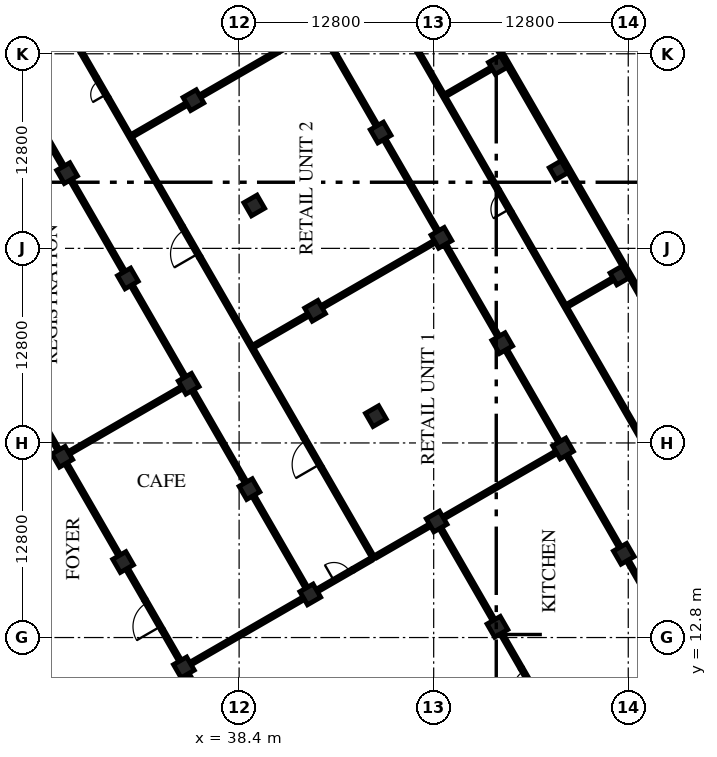
"""IFC4 building model, lengths in metres.
Left out: names, types, materials, properties, quantities, classifications, styles, units other than length and angle.
Written with IfcOpenShell. Run it as: python <this file> out.ifc"""

import sys

from ifc_helpers import new_model, si_unit, direction, frame, frame_2d, origin, origin_2d, place, context, subcontext, project, spatial, rectangle, extrude, element, fill, save


model = new_model("IFC4")
c1 = context("Model", 3, precision=1e-05, world=origin(), true_north=direction((0.0, 1.0)))
c2 = subcontext(c1, "Body", "Model", "MODEL_VIEW")
j1 = project(units=[si_unit("LENGTHUNIT", "METRE"), si_unit("PLANEANGLEUNIT", "RADIAN")], contexts=[c1])
p1 = place(None, origin())
s1 = spatial("IfcSite", under=j1, at=p1, CompositionType="ELEMENT")
p2 = place(p1, origin())
s2 = spatial("IfcBuilding", under=s1, at=p2, CompositionType="ELEMENT")
p3 = place(p2, origin())
s3 = spatial("IfcBuildingStorey", under=s2, at=p3, CompositionType="ELEMENT", Elevation=0.0)
for number, where, z_axis, x_axis in (
    (1, (55.396, 13.508, -0.3), (0.0, 0.0, 1.0), (-0.5, 0.866, 0.0)),
    (2, (63.71, 18.308, -0.3), (0.0, 0.0, 1.0), (-0.5, 0.866, 0.0)),
    (3, (34.768, 10.836, -0.3), (0.0, 0.0, 1.0), (-0.5, 0.866, 0.0)),
    (4, (43.082, 15.636, -0.3), (0.0, 0.0, 1.0), (-0.5, 0.866, 0.0)),
    (5, (51.396, 20.436, -0.3), (0.0, 0.0, 1.0), (-0.5, 0.866, 0.0)),
    (6, (59.71, 25.236, -0.3), (0.0, 0.0, 1.0), (-0.5, 0.866, 0.0)),
    (7, (30.768, 17.764, -0.3), (0.0, 0.0, 1.0), (-0.5, 0.866, 0.0)),
    (8, (39.082, 22.564, -0.3), (0.0, 0.0, 1.0), (-0.5, 0.866, 0.0)),
    (9, (47.396, 27.364, -0.3), (0.0, 0.0, 1.0), (-0.5, 0.866, 0.0)),
    (10, (55.71, 32.164, -0.3), (0.0, 0.0, 1.0), (-0.5, 0.866, 0.0)),
):
    element("IfcColumn", number, at=place(p3, frame(where, z_axis=z_axis, x_axis=x_axis)), inside=s3, PredefinedType="COLUMN", context=c2, shape_type="SweptSolid", body=[
        extrude(rectangle(XDim=1.0, YDim=1.0, at=origin_2d()), origin(), (0.0, 0.0, 1.0), 6.3),
    ])
p4 = place(p3, frame((63.417, 36.614, -0.3), z_axis=(0.0, 0.0, 1.0), x_axis=(-0.5, 0.866025403784, 0.0)))
e11 = element("IfcColumn", 11, at=p4, inside=s3, PredefinedType="COLUMN", context=c2, shape_type="SweptSolid", body=[
    extrude(rectangle(XDim=0.9, YDim=0.9, at=origin_2d()), origin(), (0.0, 0.0, 1.0), 6.3),
])
for number, where, z_axis, x_axis in (
    (12, (26.768, 24.692, -0.3), (0.0, 0.0, 1.0), (-0.5, 0.866, 0.0)),
    (13, (35.082, 29.492, -0.3), (0.0, 0.0, 1.0), (-0.5, 0.866, 0.0)),
    (14, (43.396, 34.292, -0.3), (0.0, 0.0, 1.0), (-0.5, 0.866, 0.0)),
    (15, (51.71, 39.092, -0.3), (0.0, 0.0, 1.0), (-0.5, 0.866, 0.0)),
):
    element("IfcColumn", number, at=place(p3, frame(where, z_axis=z_axis, x_axis=x_axis)), inside=s3, PredefinedType="COLUMN", context=c2, shape_type="SweptSolid", body=[
        extrude(rectangle(XDim=1.0, YDim=1.0, at=origin_2d()), origin(), (0.0, 0.0, 1.0), 6.3),
    ])
p5 = place(p3, frame((59.417, 43.542, -0.3), z_axis=(0.0, 0.0, 1.0), x_axis=(-0.5, 0.866025403784, 0.0)))
e16 = element("IfcColumn", 16, at=p5, inside=s3, PredefinedType="COLUMN", context=c2, shape_type="SweptSolid", body=[
    extrude(rectangle(XDim=0.9, YDim=0.9, at=origin_2d()), origin(), (0.0, 0.0, 1.0), 6.3),
])
for number, where, z_axis, x_axis in (
    (17, (31.082, 36.42, -0.3), (0.0, 0.0, 1.0), (-0.5, 0.866, 0.0)),
    (18, (39.396, 41.22, -0.3), (0.0, 0.0, 1.0), (-0.5, 0.866, 0.0)),
    (19, (47.71, 46.021, -0.3), (0.0, 0.0, 1.0), (-0.5, 0.866, 0.0)),
):
    element("IfcColumn", number, at=place(p3, frame(where, z_axis=z_axis, x_axis=x_axis)), inside=s3, PredefinedType="COLUMN", context=c2, shape_type="SweptSolid", body=[
        extrude(rectangle(XDim=1.0, YDim=1.0, at=origin_2d()), origin(), (0.0, 0.0, 1.0), 6.3),
    ])
p6 = place(p3, frame((55.417, 50.47, -0.3), z_axis=(0.0, 0.0, 1.0), x_axis=(-0.5, 0.866025403784, 0.0)))
e20 = element("IfcColumn", 20, at=p6, inside=s3, PredefinedType="COLUMN", context=c2, shape_type="SweptSolid", body=[
    extrude(rectangle(XDim=0.9, YDim=0.9, at=origin_2d()), origin(), (0.0, 0.0, 1.0), 6.3),
])
for number, where, z_axis, x_axis in (
    (21, (27.082, 43.349, -0.3), (0.0, 0.0, 1.0), (-0.5, 0.866, 0.0)),
    (22, (35.396, 48.149, -0.3), (0.0, 0.0, 1.0), (-0.5, 0.866, 0.0)),
):
    element("IfcColumn", number, at=place(p3, frame(where, z_axis=z_axis, x_axis=x_axis)), inside=s3, PredefinedType="COLUMN", context=c2, shape_type="SweptSolid", body=[
        extrude(rectangle(XDim=1.0, YDim=1.0, at=origin_2d()), origin(), (0.0, 0.0, 1.0), 6.3),
    ])
p7 = place(p3, frame((47.49, 65.351, 0.0), z_axis=(0.0, 0.0, 1.0), x_axis=(0.499999548647, -0.866025664373, 0.0)))
e23 = element("IfcWall", 23, at=p7, inside=s3, PredefinedType="SOLIDWALL", context=c2, shape_type="SweptSolid", body=[
    extrude(rectangle(XDim=34.6, YDim=0.25, at=frame_2d((17.3, 0.0))), origin(), (0.0, 0.0, 1.0), 5.7),
])
p8 = place(p3, frame((38.518, 4.341, 0.0), z_axis=(0.0, 0.0, 1.0), x_axis=(-0.499995173006, 0.866028190633, 0.0)))
e24 = element("IfcWall", 24, at=p8, inside=s3, PredefinedType="PARTITIONING", context=c2, shape_type="SweptSolid", body=[
    extrude(rectangle(XDim=7.0, YDim=0.2, at=frame_2d((3.5, 0.0))), origin(), (0.0, 0.0, 1.0), 5.1),
])
p9 = place(p3, frame((34.518, 11.269, 0.0), z_axis=(0.0, 0.0, 1.0), x_axis=(-0.500016218704, 0.866016039709, 0.0)))
e25 = element("IfcWall", 25, at=p9, inside=s3, PredefinedType="PARTITIONING", context=c2, shape_type="SweptSolid", body=[
    extrude(rectangle(XDim=2.35, YDim=0.2, at=frame_2d((1.175, 0.0))), origin(), (0.0, 0.0, 1.0), 5.1),
])
p10 = place(p3, frame((33.343, 13.304, 0.0), z_axis=(0.0, 0.0, 1.0), x_axis=(-0.499952165731, 0.866053019151, 0.0)))
e26 = element("IfcWall", 26, at=p10, inside=s3, PredefinedType="PARTITIONING", context=c2, shape_type="SweptSolid", body=[
    extrude(rectangle(XDim=2.3, YDim=0.2, at=frame_2d((1.15, 0.0))), origin(), (0.0, 0.0, 1.0), 5.1),
])
p11 = place(p10, frame((0.25, 0.0, 0.0)))
e27 = element("IfcOpeningElement", 27, at=p11, cuts=e26, PredefinedType="OPENING", context=c2, shape_type="SweptSolid", body=[
    extrude(rectangle(XDim=1.8, YDim=2.1, at=frame_2d((0.9, 1.05))), frame((0.0, 0.11, 0.0), z_axis=(0.0, -1.0, 0.0), x_axis=(1.0, 0.0, 0.0)), (0.0, 0.0, 1.0), 0.22),
])
p12 = place(p3, frame((32.193, 15.296, 0.0), z_axis=(0.0, 0.0, 1.0), x_axis=(-0.500016218704, 0.866016039709, 0.0)))
e28 = element("IfcWall", 28, at=p12, inside=s3, PredefinedType="PARTITIONING", context=c2, shape_type="SweptSolid", body=[
    extrude(rectangle(XDim=2.35, YDim=0.2, at=frame_2d((1.175, 0.0))), origin(), (0.0, 0.0, 1.0), 5.1),
])
for number, where, z_axis, x_axis in (
    (29, (30.518, 18.197, 0.0), (0.0, 0.0, 1.0), (-0.5, 0.866, 0.0)),
    (30, (26.518, 25.125, 0.0), (0.0, 0.0, 1.0), (-0.5, 0.866, 0.0)),
    (31, (42.832, 16.069, 0.0), (0.0, 0.0, 1.0), (-0.5, 0.866, 0.0)),
):
    element("IfcWall", number, at=place(p3, frame(where, z_axis=z_axis, x_axis=x_axis)), inside=s3, PredefinedType="PARTITIONING", context=c2, shape_type="SweptSolid", body=[
        extrude(rectangle(XDim=7.0, YDim=0.2, at=frame_2d((3.5, 0.0))), origin(), (0.0, 0.0, 1.0), 5.1),
    ])
for number, where, z_axis, x_axis in (
    (32, (38.832, 22.997, 0.0), (0.0, 0.0, 1.0), (-0.5, 0.866, 0.0)),
    (33, (34.832, 29.925, 0.0), (0.0, 0.0, 1.0), (-0.5, 0.866, 0.0)),
    (34, (30.832, 36.854, 0.0), (0.0, 0.0, 1.0), (-0.5, 0.866, 0.0)),
):
    element("IfcWall", number, at=place(p3, frame(where, z_axis=z_axis, x_axis=x_axis)), inside=s3, PredefinedType="PARTITIONING", context=c2, shape_type="SweptSolid", body=[
        extrude(rectangle(XDim=7.0, YDim=0.2, at=frame_2d((3.5, 0.0))), origin(), (0.0, 0.0, 1.0), 5.1),
    ])
p13 = place(p3, frame((26.832, 43.781, 0.0), z_axis=(0.0, 0.0, 1.0), x_axis=(-0.499988857673, 0.866031836714, 0.0)))
e35 = element("IfcWall", 35, at=p13, inside=s3, PredefinedType="PARTITIONING", context=c2, shape_type="SweptSolid", body=[
    extrude(rectangle(XDim=6.875, YDim=0.2, at=frame_2d((3.438, 0.0))), origin(), (0.0, 0.0, 1.0), 5.1),
])
p14 = place(p3, frame((47.239, 18.036, 0.0), z_axis=(0.0, 0.0, 1.0), x_axis=(-0.500014519185, 0.866017020967, 0.0)))
e36 = element("IfcWall", 36, at=p14, inside=s3, PredefinedType="PARTITIONING", context=c2, shape_type="SweptSolid", body=[
    extrude(rectangle(XDim=6.85, YDim=0.2, at=frame_2d((3.425, 0.0))), origin(), (0.0, 0.0, 1.0), 5.1),
])
p15 = place(p3, frame((43.814, 23.968, 0.0), z_axis=(0.0, 0.0, 1.0), x_axis=(-0.500031774688, 0.866007057882, 0.0)))
e37 = element("IfcWall", 37, at=p15, inside=s3, PredefinedType="PARTITIONING", context=c2, shape_type="SweptSolid", body=[
    extrude(rectangle(XDim=2.3, YDim=0.2, at=frame_2d((1.15, 0.0))), origin(), (0.0, 0.0, 1.0), 5.1),
])
p16 = place(p15, frame((0.25, 0.0, 0.0)))
e38 = element("IfcOpeningElement", 38, at=p16, cuts=e37, PredefinedType="OPENING", context=c2, shape_type="SweptSolid", body=[
    extrude(rectangle(XDim=1.8, YDim=2.1, at=frame_2d((0.9, 1.05))), frame((0.0, 0.11, 0.0), z_axis=(0.0, -1.0, 0.0), x_axis=(1.0, 0.0, 0.0)), (0.0, 0.0, 1.0), 0.22),
])
p17 = place(p3, frame((42.664, 25.96, 0.0), z_axis=(0.0, 0.0, 1.0), x_axis=(-0.499993437113, 0.866029192836, 0.0)))
e39 = element("IfcWall", 39, at=p17, inside=s3, PredefinedType="PARTITIONING", context=c2, shape_type="SweptSolid", body=[
    extrude(rectangle(XDim=13.7, YDim=0.2, at=frame_2d((6.85, 0.0))), origin(), (0.0, 0.0, 1.0), 5.1),
])
p18 = place(p3, frame((35.814, 37.824, 0.0), z_axis=(0.0, 0.0, 1.0), x_axis=(-0.500031774688, 0.866007057882, 0.0)))
e40 = element("IfcWall", 40, at=p18, inside=s3, PredefinedType="PARTITIONING", context=c2, shape_type="SweptSolid", body=[
    extrude(rectangle(XDim=2.3, YDim=0.2, at=frame_2d((1.15, 0.0))), origin(), (0.0, 0.0, 1.0), 5.1),
])
p19 = place(p18, frame((0.25, 0.0, 0.0)))
e41 = element("IfcOpeningElement", 41, at=p19, cuts=e40, PredefinedType="OPENING", context=c2, shape_type="SweptSolid", body=[
    extrude(rectangle(XDim=1.8, YDim=2.1, at=frame_2d((0.9, 1.05))), frame((0.0, 0.11, 0.0), z_axis=(0.0, -1.0, 0.0), x_axis=(1.0, 0.0, 0.0)), (0.0, 0.0, 1.0), 0.22),
])
p20 = place(p3, frame((34.664, 39.816, 0.0), z_axis=(0.0, 0.0, 1.0), x_axis=(-0.49999201416, 0.866030014362, 0.0)))
e42 = element("IfcWall", 42, at=p20, inside=s3, PredefinedType="PARTITIONING", context=c2, shape_type="SweptSolid", body=[
    extrude(rectangle(XDim=9.8, YDim=0.2, at=frame_2d((4.9, 0.0))), origin(), (0.0, 0.0, 1.0), 5.1),
])
p21 = place(p3, frame((29.764, 48.303, 0.0), z_axis=(0.0, 0.0, 1.0), x_axis=(-0.500060622324, 0.86599040064, 0.0)))
e43 = element("IfcWall", 43, at=p21, inside=s3, PredefinedType="PARTITIONING", context=c2, shape_type="SweptSolid", body=[
    extrude(rectangle(XDim=1.5, YDim=0.2, at=frame_2d((0.75, 0.0))), origin(), (0.0, 0.0, 1.0), 5.1),
])
p22 = place(p21, frame((0.25, 0.0, 0.0)))
e44 = element("IfcOpeningElement", 44, at=p22, cuts=e43, PredefinedType="OPENING", context=c2, shape_type="SweptSolid", body=[
    extrude(rectangle(XDim=1.0, YDim=2.1, at=frame_2d((0.5, 1.05))), frame((0.0, 0.11, 0.0), z_axis=(0.0, -1.0, 0.0), x_axis=(1.0, 0.0, 0.0)), (0.0, 0.0, 1.0), 0.22),
])
p23 = place(p3, frame((29.014, 49.602, 0.0), z_axis=(0.0, 0.0, 1.0), x_axis=(-0.499963291492, 0.866046596414, 0.0)))
e45 = element("IfcWall", 45, at=p23, inside=s3, PredefinedType="PARTITIONING", context=c2, shape_type="SweptSolid", body=[
    extrude(rectangle(XDim=2.925, YDim=0.2, at=frame_2d((1.462, 0.0))), origin(), (0.0, 0.0, 1.0), 5.1),
])
p24 = place(p3, frame((57.821, 9.307, 0.0), z_axis=(0.0, 0.0, 1.0), x_axis=(-0.500062241894, 0.865989465428, 0.0)))
e46 = element("IfcWall", 46, at=p24, inside=s3, PredefinedType="PARTITIONING", context=c2, shape_type="SweptSolid", body=[
    extrude(rectangle(XDim=1.7, YDim=0.2, at=frame_2d((0.85, 0.0))), origin(), (0.0, 0.0, 1.0), 5.1),
])
p25 = place(p24, frame((0.25, 0.0, 0.0)))
e47 = element("IfcOpeningElement", 47, at=p25, cuts=e46, PredefinedType="OPENING", context=c2, shape_type="SweptSolid", body=[
    extrude(rectangle(XDim=1.2, YDim=2.1, at=frame_2d((0.6, 1.05))), frame((0.0, 0.11, 0.0), z_axis=(0.0, -1.0, 0.0), x_axis=(1.0, 0.0, 0.0)), (0.0, 0.0, 1.0), 0.22),
])
p26 = place(p3, frame((56.971, 10.78, 0.0), z_axis=(0.0, 0.0, 1.0), x_axis=(-0.499953715521, 0.866052124492, 0.0)))
e48 = element("IfcWall", 48, at=p26, inside=s3, PredefinedType="PARTITIONING", context=c2, shape_type="SweptSolid", body=[
    extrude(rectangle(XDim=2.65, YDim=0.2, at=frame_2d((1.325, 0.0))), origin(), (0.0, 0.0, 1.0), 5.1),
])
p27 = place(p3, frame((55.146, 13.941, 0.0), z_axis=(0.0, 0.0, 1.0), x_axis=(-0.500010275428, 0.866019471182, 0.0)))
e49 = element("IfcWall", 49, at=p27, inside=s3, PredefinedType="PARTITIONING", context=c2, shape_type="SweptSolid", body=[
    extrude(rectangle(XDim=7.0, YDim=0.2, at=frame_2d((3.5, 0.0))), origin(), (0.0, 0.0, 1.0), 5.1),
])
p28 = place(p3, frame((65.285, 15.58, 0.0), z_axis=(0.0, 0.0, 1.0), x_axis=(-0.499993606316, 0.866029095148, 0.0)))
e50 = element("IfcWall", 50, at=p28, inside=s3, PredefinedType="PARTITIONING", context=c2, shape_type="SweptSolid", body=[
    extrude(rectangle(XDim=2.65, YDim=0.2, at=frame_2d((1.325, 0.0))), origin(), (0.0, 0.0, 1.0), 5.1),
])
for number, where, z_axis, x_axis in (
    (51, (63.46, 18.74, 0.0), (0.0, 0.0, 1.0), (-0.5, 0.866, 0.0)),
    (52, (59.46, 25.669, 0.0), (0.0, 0.0, 1.0), (-0.5, 0.866, 0.0)),
    (53, (55.46, 32.597, 0.0), (0.0, 0.0, 1.0), (-0.5, 0.866, 0.0)),
    (54, (51.46, 39.525, 0.0), (0.0, 0.0, 1.0), (-0.5, 0.866, 0.0)),
    (55, (47.46, 46.453, 0.0), (0.0, 0.0, 1.0), (-0.5, 0.866, 0.0)),
):
    element("IfcWall", number, at=place(p3, frame(where, z_axis=z_axis, x_axis=x_axis)), inside=s3, PredefinedType="PARTITIONING", context=c2, shape_type="SweptSolid", body=[
        extrude(rectangle(XDim=7.0, YDim=0.2, at=frame_2d((3.5, 0.0))), origin(), (0.0, 0.0, 1.0), 5.1),
    ])
p29 = place(p3, frame((67.242, 21.79, 0.0), z_axis=(0.0, 0.0, 1.0), x_axis=(-0.500004551153, 0.866022776159, 0.0)))
e56 = element("IfcWall", 56, at=p29, inside=s3, PredefinedType="PARTITIONING", context=c2, shape_type="SweptSolid", body=[
    extrude(rectangle(XDim=21.9, YDim=0.2, at=frame_2d((10.95, 0.0))), origin(), (0.0, 0.0, 1.0), 5.1),
])
p30 = place(p3, frame((56.292, 40.756, 0.0), z_axis=(0.0, 0.0, 1.0), x_axis=(-0.499954529098, 0.86605165483, 0.0)))
e57 = element("IfcWall", 57, at=p30, inside=s3, PredefinedType="PARTITIONING", context=c2, shape_type="SweptSolid", body=[
    extrude(rectangle(XDim=1.7, YDim=0.2, at=frame_2d((0.85, 0.0))), origin(), (0.0, 0.0, 1.0), 5.1),
])
p31 = place(p30, frame((0.25, 0.0, 0.0)))
e58 = element("IfcOpeningElement", 58, at=p31, cuts=e57, PredefinedType="OPENING", context=c2, shape_type="SweptSolid", body=[
    extrude(rectangle(XDim=1.2, YDim=2.1, at=frame_2d((0.6, 1.05))), frame((0.0, 0.11, 0.0), z_axis=(0.0, -1.0, 0.0), x_axis=(1.0, 0.0, 0.0)), (0.0, 0.0, 1.0), 0.22),
])
p32 = place(p3, frame((55.442, 42.228, 0.0), z_axis=(0.0, 0.0, 1.0), x_axis=(-0.500004228592, 0.866022962392, 0.0)))
e59 = element("IfcWall", 59, at=p32, inside=s3, PredefinedType="PARTITIONING", context=c2, shape_type="SweptSolid", body=[
    extrude(rectangle(XDim=14.3, YDim=0.2, at=frame_2d((7.15, 0.0))), origin(), (0.0, 0.0, 1.0), 5.1),
])
p33 = place(p3, frame((35.201, 11.086, 0.0), z_axis=(0.0, 0.0, 1.0), x_axis=(0.866021068297, 0.500007509209, 0.0)))
e60 = element("IfcWall", 60, at=p33, inside=s3, PredefinedType="PARTITIONING", context=c2, shape_type="SweptSolid", body=[
    extrude(rectangle(XDim=8.6, YDim=0.2, at=frame_2d((4.3, 0.0))), origin(), (0.0, 0.0, 1.0), 5.1),
])
p34 = place(p3, frame((43.515, 15.886, 0.0), z_axis=(0.0, 0.0, 1.0), x_axis=(0.866027397988, 0.499996545922, 0.0)))
e61 = element("IfcWall", 61, at=p34, inside=s3, PredefinedType="PARTITIONING", context=c2, shape_type="SweptSolid", body=[
    extrude(rectangle(XDim=2.75, YDim=0.2, at=frame_2d((1.375, 0.0))), origin(), (0.0, 0.0, 1.0), 5.1),
])
p35 = place(p34, frame((1.3, 0.0, 0.0)))
e62 = element("IfcOpeningElement", 62, at=p35, cuts=e61, PredefinedType="OPENING", context=c2, shape_type="SweptSolid", body=[
    extrude(rectangle(XDim=1.2, YDim=2.1, at=frame_2d((0.6, 1.05))), frame((0.0, 0.11, 0.0), z_axis=(0.0, -1.0, 0.0), x_axis=(1.0, 0.0, 0.0)), (0.0, 0.0, 1.0), 0.22),
])
p36 = place(p3, frame((45.896, 17.261, 0.0), z_axis=(0.0, 0.0, 1.0), x_axis=(0.866017369001, 0.500013916395, 0.0)))
e63 = element("IfcWall", 63, at=p36, inside=s3, PredefinedType="PARTITIONING", context=c2, shape_type="SweptSolid", body=[
    extrude(rectangle(XDim=1.45, YDim=0.2, at=frame_2d((0.725, 0.0))), origin(), (0.0, 0.0, 1.0), 5.1),
])
p37 = place(p3, frame((47.325, 18.086, 0.0), z_axis=(0.0, 0.0, 1.0), x_axis=(0.866023935413, 0.500002543286, 0.0)))
e64 = element("IfcWall", 64, at=p37, inside=s3, PredefinedType="PARTITIONING", context=c2, shape_type="SweptSolid", body=[
    extrude(rectangle(XDim=4.2, YDim=0.2, at=frame_2d((2.1, 0.0))), origin(), (0.0, 0.0, 1.0), 5.1),
])
p38 = place(p3, frame((51.829, 20.686, 0.0), z_axis=(0.0, 0.0, 1.0), x_axis=(0.866021068297, 0.500007509209, 0.0)))
e65 = element("IfcWall", 65, at=p38, inside=s3, PredefinedType="PARTITIONING", context=c2, shape_type="SweptSolid", body=[
    extrude(rectangle(XDim=8.6, YDim=0.2, at=frame_2d((4.3, 0.0))), origin(), (0.0, 0.0, 1.0), 5.1),
])
p39 = place(p3, frame((59.953, 34.614, 0.0), z_axis=(0.0, 0.0, 1.0), x_axis=(0.8660424351, 0.499970499736, 0.0)))
e66 = element("IfcWall", 66, at=p39, inside=s3, PredefinedType="PARTITIONING", context=c2, shape_type="SweptSolid", body=[
    extrude(rectangle(XDim=3.55, YDim=0.2, at=frame_2d((1.775, 0.0))), origin(), (0.0, 0.0, 1.0), 5.1),
])
p40 = place(p3, frame((27.201, 24.942, 0.0), z_axis=(0.0, 0.0, 1.0), x_axis=(0.866021068297, 0.500007509209, 0.0)))
e67 = element("IfcWall", 67, at=p40, inside=s3, PredefinedType="PARTITIONING", context=c2, shape_type="SweptSolid", body=[
    extrude(rectangle(XDim=8.6, YDim=0.2, at=frame_2d((4.3, 0.0))), origin(), (0.0, 0.0, 1.0), 5.1),
])
p41 = place(p3, frame((39.325, 31.942, 0.0), z_axis=(0.0, 0.0, 1.0), x_axis=(0.866023935413, 0.500002543286, 0.0)))
e68 = element("IfcWall", 68, at=p41, inside=s3, PredefinedType="PARTITIONING", context=c2, shape_type="SweptSolid", body=[
    extrude(rectangle(XDim=4.2, YDim=0.2, at=frame_2d((2.1, 0.0))), origin(), (0.0, 0.0, 1.0), 5.1),
])
p42 = place(p3, frame((43.829, 34.542, 0.0), z_axis=(0.0, 0.0, 1.0), x_axis=(0.866021068297, 0.500007509209, 0.0)))
e69 = element("IfcWall", 69, at=p42, inside=s3, PredefinedType="PARTITIONING", context=c2, shape_type="SweptSolid", body=[
    extrude(rectangle(XDim=8.6, YDim=0.2, at=frame_2d((4.3, 0.0))), origin(), (0.0, 0.0, 1.0), 5.1),
])
p43 = place(p3, frame((51.953, 48.47, 0.0), z_axis=(0.0, 0.0, 1.0), x_axis=(0.8660424351, 0.499970499736, 0.0)))
e70 = element("IfcWall", 70, at=p43, inside=s3, PredefinedType="PARTITIONING", context=c2, shape_type="SweptSolid", body=[
    extrude(rectangle(XDim=3.55, YDim=0.2, at=frame_2d((1.775, 0.0))), origin(), (0.0, 0.0, 1.0), 5.1),
])
p44 = place(p3, frame((31.325, 45.799, 0.0), z_axis=(0.0, 0.0, 1.0), x_axis=(0.866023935413, 0.500002543286, 0.0)))
e71 = element("IfcWall", 71, at=p44, inside=s3, PredefinedType="PARTITIONING", context=c2, shape_type="SweptSolid", body=[
    extrude(rectangle(XDim=4.2, YDim=0.2, at=frame_2d((2.1, 0.0))), origin(), (0.0, 0.0, 1.0), 5.1),
])
p45 = place(p3, frame((35.829, 48.399, 0.0), z_axis=(0.0, 0.0, 1.0), x_axis=(0.866033360935, 0.499986217557, 0.0)))
e72 = element("IfcWall", 72, at=p45, inside=s3, PredefinedType="PARTITIONING", context=c2, shape_type="SweptSolid", body=[
    extrude(rectangle(XDim=8.6, YDim=0.2, at=frame_2d((4.3, 0.0))), origin(), (0.0, 0.0, 1.0), 5.1),
])
p46 = place(p11, origin())
e73 = element("IfcDoor", 73, at=p46, inside=s3, OperationType="DOUBLE_DOOR_SINGLE_SWING", PredefinedType="DOOR", context=c2, shape_type="SweptSolid", body=[
    extrude(rectangle(XDim=1.8, YDim=2.1, at=frame_2d((0.9, 1.05))), frame((0.0, 0.025, 0.0), z_axis=(0.0, -1.0, 0.0), x_axis=(1.0, 0.0, 0.0)), (0.0, 0.0, 1.0), 0.05),
])
fill(e27, e73)
p47 = place(p16, origin())
e74 = element("IfcDoor", 74, at=p47, inside=s3, OperationType="DOUBLE_DOOR_SINGLE_SWING", PredefinedType="DOOR", context=c2, shape_type="SweptSolid", body=[
    extrude(rectangle(XDim=1.8, YDim=2.1, at=frame_2d((0.9, 1.05))), frame((0.0, 0.025, 0.0), z_axis=(0.0, -1.0, 0.0), x_axis=(1.0, 0.0, 0.0)), (0.0, 0.0, 1.0), 0.05),
])
fill(e38, e74)
p48 = place(p19, origin())
e75 = element("IfcDoor", 75, at=p48, inside=s3, OperationType="DOUBLE_DOOR_SINGLE_SWING", PredefinedType="DOOR", context=c2, shape_type="SweptSolid", body=[
    extrude(rectangle(XDim=1.8, YDim=2.1, at=frame_2d((0.9, 1.05))), frame((0.0, 0.025, 0.0), z_axis=(0.0, -1.0, 0.0), x_axis=(1.0, 0.0, 0.0)), (0.0, 0.0, 1.0), 0.05),
])
fill(e41, e75)
p49 = place(p22, origin())
e76 = element("IfcDoor", 76, at=p49, inside=s3, OperationType="SINGLE_SWING_LEFT", PredefinedType="DOOR", context=c2, shape_type="SweptSolid", body=[
    extrude(rectangle(XDim=1.0, YDim=2.1, at=frame_2d((0.5, 1.05))), frame((0.0, 0.025, 0.0), z_axis=(0.0, -1.0, 0.0), x_axis=(1.0, 0.0, 0.0)), (0.0, 0.0, 1.0), 0.05),
])
fill(e44, e76)
p50 = place(p25, origin())
e77 = element("IfcDoor", 77, at=p50, inside=s3, OperationType="SINGLE_SWING_LEFT", PredefinedType="DOOR", context=c2, shape_type="SweptSolid", body=[
    extrude(rectangle(XDim=1.2, YDim=2.1, at=frame_2d((0.6, 1.05))), frame((0.0, 0.025, 0.0), z_axis=(0.0, -1.0, 0.0), x_axis=(1.0, 0.0, 0.0)), (0.0, 0.0, 1.0), 0.05),
])
fill(e47, e77)
p51 = place(p31, origin())
e78 = element("IfcDoor", 78, at=p51, inside=s3, OperationType="SINGLE_SWING_LEFT", PredefinedType="DOOR", context=c2, shape_type="SweptSolid", body=[
    extrude(rectangle(XDim=1.2, YDim=2.1, at=frame_2d((0.6, 1.05))), frame((0.0, 0.025, 0.0), z_axis=(0.0, -1.0, 0.0), x_axis=(1.0, 0.0, 0.0)), (0.0, 0.0, 1.0), 0.05),
])
fill(e58, e78)
p52 = place(p35, origin())
e79 = element("IfcDoor", 79, at=p52, inside=s3, OperationType="SINGLE_SWING_LEFT", PredefinedType="DOOR", context=c2, shape_type="SweptSolid", body=[
    extrude(rectangle(XDim=1.2, YDim=2.1, at=frame_2d((0.6, 1.05))), frame((0.0, 0.025, 0.0), z_axis=(0.0, -1.0, 0.0), x_axis=(1.0, 0.0, 0.0)), (0.0, 0.0, 1.0), 0.05),
])
fill(e62, e79)
save(model, sys.argv[1])
